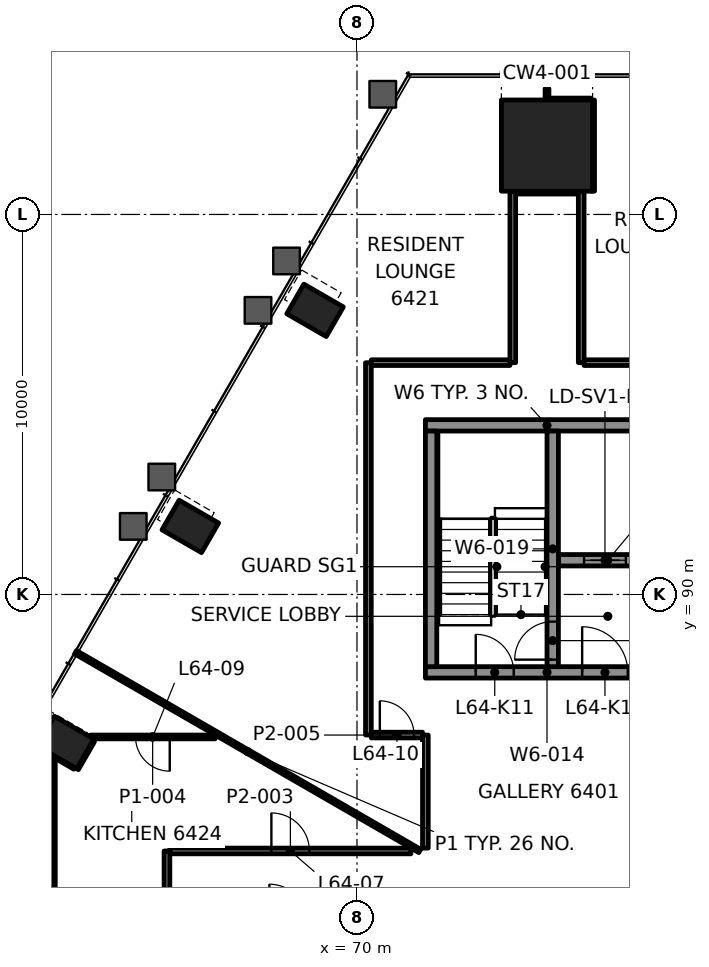
"""IFC4 building model, lengths in metres.
Left out: names, types, materials, properties, quantities, classifications, styles, units other than length and angle.
Written with IfcOpenShell. Run it as: python <this file> out.ifc"""

import sys

from ifc_helpers import new_model, si_unit, direction, frame, frame_2d, origin, origin_2d, place, context, subcontext, project, spatial, rectangle, hollow_rectangle, extrude, element, fill, save


model = new_model("IFC4")
c1 = context("Model", 3, precision=1e-05, world=origin(), true_north=direction((0.0, 1.0)))
c2 = subcontext(c1, "Body", "Model", "MODEL_VIEW")
j1 = project(units=[si_unit("LENGTHUNIT", "METRE"), si_unit("PLANEANGLEUNIT", "RADIAN")], contexts=[c1])
p1 = place(None, origin())
s1 = spatial("IfcSite", under=j1, at=p1, CompositionType="ELEMENT")
p2 = place(p1, origin())
s2 = spatial("IfcBuilding", under=s1, at=p2, CompositionType="ELEMENT")
p3 = place(p2, frame((0.0, 0.0, 270.6)))
s3 = spatial("IfcBuildingStorey", under=s2, at=p3, CompositionType="ELEMENT", Elevation=270.6)
p4 = place(p3, frame((75.0, 101.812, 0.0), z_axis=(0.0, 0.0, 1.0), x_axis=(-1.0, 0.0, 0.0)))
e1 = element("IfcColumn", 1, at=p4, inside=s3, PredefinedType="COLUMN", context=c2, shape_type="SweptSolid", body=[
    extrude(rectangle(XDim=2.4, YDim=2.4, at=origin_2d()), origin(), (0.0, 0.0, 1.0), 3.5),
])
for number, where, z_axis, x_axis in (
    (2, (68.897, 97.476, -0.0), (0.0, 0.0, 1.0), (-0.5, -0.866, 0.0)),
    (3, (65.614, 91.791, -0.0), (0.0, 0.0, 1.0), (-0.5, -0.866, 0.0)),
    (4, (62.332, 86.105, -0.0), (0.0, 0.0, 1.0), (-0.5, -0.866, 0.0)),
):
    element("IfcColumn", number, at=place(p3, frame(where, z_axis=z_axis, x_axis=x_axis)), inside=s3, PredefinedType="COLUMN", context=c2, shape_type="SweptSolid", body=[
        extrude(hollow_rectangle(XDim=0.9, YDim=1.2, WallThickness=0.06, at=origin_2d()), origin(), (0.0, 0.0, 1.0), 3.5),
    ])
p5 = place(p3, frame((71.8, 87.95, 0.0), z_axis=(0.0, 0.0, 1.0), x_axis=(1.0, 0.0, 0.0)))
e5 = element("IfcWall", 5, at=p5, inside=s3, PredefinedType="SHEAR", context=c2, shape_type="SweptSolid", body=[
    extrude(rectangle(XDim=6.4, YDim=0.3, at=frame_2d((3.2, 0.0))), origin(), (0.0, 0.0, 1.0), 3.3),
])
p6 = place(p5, frame((1.325, 0.0, 0.0)))
e6 = element("IfcOpeningElement", 6, at=p6, cuts=e5, PredefinedType="OPENING", context=c2, shape_type="SweptSolid", body=[
    extrude(rectangle(XDim=1.0, YDim=2.1, at=frame_2d((0.5, 1.05))), frame((0.0, 0.16, 0.0), z_axis=(0.0, -1.0, 0.0), x_axis=(1.0, 0.0, 0.0)), (0.0, 0.0, 1.0), 0.32),
])
p7 = place(p5, frame((4.125, 0.0, 0.0)))
e7 = element("IfcOpeningElement", 7, at=p7, cuts=e5, PredefinedType="OPENING", context=c2, shape_type="SweptSolid", body=[
    extrude(rectangle(XDim=1.2, YDim=2.1, at=frame_2d((0.6, 1.05))), frame((0.0, 0.16, 0.0), z_axis=(0.0, -1.0, 0.0), x_axis=(1.0, 0.0, 0.0)), (0.0, 0.0, 1.0), 0.32),
])
p8 = place(p3, frame((71.8, 94.45, 0.0), z_axis=(0.0, 0.0, 1.0), x_axis=(1.0, 0.0, 0.0)))
e8 = element("IfcWall", 8, at=p8, inside=s3, PredefinedType="SHEAR", context=c2, shape_type="SweptSolid", body=[
    extrude(rectangle(XDim=6.4, YDim=0.3, at=frame_2d((3.2, 0.0))), origin(), (0.0, 0.0, 1.0), 3.3),
])
p9 = place(p3, frame((71.95, 88.1, 0.0), z_axis=(0.0, 0.0, 1.0), x_axis=(0.0, 1.0, 0.0)))
e9 = element("IfcWall", 9, at=p9, inside=s3, PredefinedType="SHEAR", context=c2, shape_type="SweptSolid", body=[
    extrude(rectangle(XDim=6.2, YDim=0.3, at=frame_2d((3.1, 0.0))), origin(), (0.0, 0.0, 1.0), 3.3),
])
p10 = place(p3, frame((75.3, 90.9, 0.0), z_axis=(0.0, 0.0, 1.0), x_axis=(1.0, 0.0, 0.0)))
e10 = element("IfcWall", 10, at=p10, inside=s3, PredefinedType="SHEAR", context=c2, shape_type="SweptSolid", body=[
    extrude(rectangle(XDim=2.6, YDim=0.3, at=frame_2d((1.3, 0.0))), origin(), (0.0, 0.0, 1.0), 3.3),
])
p11 = place(p10, frame((0.675, 0.0, 0.0)))
e11 = element("IfcOpeningElement", 11, at=p11, cuts=e10, PredefinedType="OPENING", context=c2, shape_type="SweptSolid", body=[
    extrude(rectangle(XDim=1.1, YDim=2.1, at=frame_2d((0.55, 1.05))), frame((0.0, 0.16, 0.0), z_axis=(0.0, -1.0, 0.0), x_axis=(1.0, 0.0, 0.0)), (0.0, 0.0, 1.0), 0.32),
])
p12 = place(p3, frame((75.15, 88.1, 0.0), z_axis=(0.0, 0.0, 1.0), x_axis=(0.0, 1.0, 0.0)))
e12 = element("IfcWall", 12, at=p12, inside=s3, PredefinedType="SHEAR", context=c2, shape_type="SweptSolid", body=[
    extrude(rectangle(XDim=6.2, YDim=0.3, at=frame_2d((3.1, 0.0))), origin(), (0.0, 0.0, 1.0), 3.3),
])
p13 = place(p12, frame((0.185, 0.0, 0.0)))
e13 = element("IfcOpeningElement", 13, at=p13, cuts=e12, PredefinedType="OPENING", context=c2, shape_type="SweptSolid", body=[
    extrude(rectangle(XDim=1.0, YDim=2.1, at=frame_2d((0.5, 1.05))), frame((0.0, 0.16, 0.0), z_axis=(0.0, -1.0, 0.0), x_axis=(1.0, 0.0, 0.0)), (0.0, 0.0, 1.0), 0.32),
])
p14 = place(p3, frame((65.075, 83.25, 0.0), z_axis=(0.0, 0.0, 1.0), x_axis=(1.0, 0.0, 0.0)))
e14 = element("IfcWall", 14, at=p14, inside=s3, PredefinedType="PARTITIONING", context=c2, shape_type="SweptSolid", body=[
    extrude(rectangle(XDim=6.345, YDim=0.15, at=frame_2d((3.172, 0.0))), origin(), (0.0, 0.0, 1.0), 2.7),
])
p15 = place(p14, frame((2.672, 0.0, 0.0)))
e15 = element("IfcOpeningElement", 15, at=p15, cuts=e14, PredefinedType="OPENING", context=c2, shape_type="SweptSolid", body=[
    extrude(rectangle(XDim=1.0, YDim=2.1, at=frame_2d((0.5, 1.05))), frame((0.0, 0.085, 0.0), z_axis=(0.0, -1.0, 0.0), x_axis=(1.0, 0.0, 0.0)), (0.0, 0.0, 1.0), 0.17),
])
p16 = place(p3, frame((66.267, 86.25, 0.0), z_axis=(0.0, 0.0, 1.0), x_axis=(-1.0, 0.0, 0.0)))
e16 = element("IfcWall", 16, at=p16, inside=s3, PredefinedType="PARTITIONING", context=c2, shape_type="SweptSolid", body=[
    extrude(rectangle(XDim=3.287, YDim=0.1, at=frame_2d((1.644, 0.0))), origin(), (0.0, 0.0, 1.0), 2.7),
])
p17 = place(p16, frame((1.193, 0.0, 0.0)))
e17 = element("IfcOpeningElement", 17, at=p17, cuts=e16, PredefinedType="OPENING", context=c2, shape_type="SweptSolid", body=[
    extrude(rectangle(XDim=0.9, YDim=2.1, at=frame_2d((0.45, 1.05))), frame((0.0, 0.06, 0.0), z_axis=(0.0, -1.0, 0.0), x_axis=(1.0, 0.0, 0.0)), (0.0, 0.0, 1.0), 0.12),
])
p18 = place(p3, frame((70.377, 86.3, 0.0), z_axis=(0.0, 0.0, 1.0), x_axis=(1.0, 0.0, 0.0)))
e18 = element("IfcWall", 18, at=p18, inside=s3, PredefinedType="PARTITIONING", context=c2, shape_type="SweptSolid", body=[
    extrude(rectangle(XDim=1.348, YDim=0.15, at=frame_2d((0.674, 0.0))), origin(), (0.0, 0.0, 1.0), 2.7),
])
p19 = place(p18, frame((0.224, 0.0, 0.0)))
e19 = element("IfcOpeningElement", 19, at=p19, cuts=e18, PredefinedType="OPENING", context=c2, shape_type="SweptSolid", body=[
    extrude(rectangle(XDim=0.9, YDim=2.1, at=frame_2d((0.45, 1.05))), frame((0.0, 0.085, 0.0), z_axis=(0.0, -1.0, 0.0), x_axis=(1.0, 0.0, 0.0)), (0.0, 0.0, 1.0), 0.17),
])
for number, where, z_axis, x_axis in (
    (20, (70.377, 96.1, 0.0), (0.0, 0.0, 1.0), (1.0, 0.0, 0.0)),
    (21, (75.975, 96.1, 0.0), (0.0, 0.0, 1.0), (1.0, 0.0, 0.0)),
):
    element("IfcWall", number, at=place(p3, frame(where, z_axis=z_axis, x_axis=x_axis)), inside=s3, PredefinedType="PARTITIONING", context=c2, shape_type="SweptSolid", body=[
        extrude(rectangle(XDim=3.648, YDim=0.15, at=frame_2d((1.824, 0.0))), origin(), (0.0, 0.0, 1.0), 2.7),
    ])
p20 = place(p3, frame((74.176, 100.612, 0.0), z_axis=(0.0, 0.0, 1.0), x_axis=(1.0, 0.0, 0.0)))
e22 = element("IfcWall", 22, at=p20, inside=s3, PredefinedType="PARTITIONING", context=c2, shape_type="SweptSolid", body=[
    extrude(rectangle(XDim=1.643, YDim=0.15, at=frame_2d((0.821, 0.0))), origin(), (0.0, 0.0, 1.0), 2.697),
])
p21 = place(p3, frame((75.0, 103.012, 0.0), z_axis=(0.0, 0.0, 1.0), x_axis=(1.0, 0.0, 0.0)))
e23 = element("IfcWall", 23, at=p21, inside=s3, PredefinedType="PARTITIONING", context=c2, shape_type="SweptSolid", body=[
    extrude(rectangle(XDim=1.147, YDim=0.1, at=frame_2d((0.574, 0.0))), origin(), (0.0, 0.0, 1.0), 2.7),
])
p22 = place(p3, frame((62.626, 85.415, 0.0), z_axis=(0.0, 0.0, 1.0), x_axis=(0.499973348067, 0.866040790738, 0.0)))
e24 = element("IfcWall", 24, at=p22, inside=s3, PredefinedType="PARTITIONING", context=c2, shape_type="SweptSolid", body=[
    extrude(rectangle(XDim=0.842, YDim=0.1, at=frame_2d((0.421, 0.0))), origin(), (0.0, 0.0, 1.0), 2.7),
])
p23 = place(p3, frame((76.2, 100.614, 0.0), z_axis=(0.0, 0.0, 1.0), x_axis=(0.0, 1.0, 0.0)))
e25 = element("IfcWall", 25, at=p23, inside=s3, PredefinedType="PARTITIONING", context=c2, shape_type="SweptSolid", body=[
    extrude(rectangle(XDim=2.396, YDim=0.1, at=frame_2d((1.198, 0.0))), origin(), (0.0, 0.0, 1.0), 2.7),
])
p24 = place(p3, frame((75.9, 96.1, 0.0), z_axis=(0.0, 0.0, 1.0), x_axis=(0.0, 1.0, 0.0)))
e26 = element("IfcWall", 26, at=p24, inside=s3, PredefinedType="PARTITIONING", context=c2, shape_type="SweptSolid", body=[
    extrude(rectangle(XDim=4.512, YDim=0.15, at=frame_2d((2.256, 0.0))), origin(), (0.0, 0.0, 1.0), 2.7),
])
p25 = place(p3, frame((75.0, 103.062, 0.0), z_axis=(0.0, 0.0, 1.0), x_axis=(0.0, 1.0, 0.0)))
e27 = element("IfcWall", 27, at=p25, inside=s3, PredefinedType="PARTITIONING", context=c2, shape_type="SweptSolid", body=[
    extrude(rectangle(XDim=0.249, YDim=0.1, at=frame_2d((0.125, 0.0))), origin(), (0.0, 0.0, 1.0), 2.7),
])
p26 = place(p3, frame((74.1, 96.1, 0.0), z_axis=(0.0, 0.0, 1.0), x_axis=(0.0, 1.0, 0.0)))
e28 = element("IfcWall", 28, at=p26, inside=s3, PredefinedType="PARTITIONING", context=c2, shape_type="SweptSolid", body=[
    extrude(rectangle(XDim=4.511, YDim=0.15, at=frame_2d((2.256, 0.0))), origin(), (0.0, 0.0, 1.0), 2.7),
])
p27 = place(p3, frame((71.8, 83.325, 0.0), z_axis=(0.0, 0.0, 1.0), x_axis=(0.0, 1.0, 0.0)))
e29 = element("IfcWall", 29, at=p27, inside=s3, PredefinedType="PARTITIONING", context=c2, shape_type="SweptSolid", body=[
    extrude(rectangle(XDim=2.975, YDim=0.15, at=frame_2d((1.488, 0.0))), origin(), (0.0, 0.0, 1.0), 2.697),
])
p28 = place(p3, frame((70.3, 86.302, 0.0), z_axis=(0.0, 0.0, 1.0), x_axis=(0.0, 1.0, 0.0)))
e30 = element("IfcWall", 30, at=p28, inside=s3, PredefinedType="PARTITIONING", context=c2, shape_type="SweptSolid", body=[
    extrude(rectangle(XDim=9.796, YDim=0.15, at=frame_2d((4.898, 0.0))), origin(), (0.0, 0.0, 1.0), 2.7),
])
p29 = place(p3, frame((65.0, 70.352, 0.0), z_axis=(0.0, 0.0, 1.0), x_axis=(0.0, 1.0, 0.0)))
e31 = element("IfcWall", 31, at=p29, inside=s3, PredefinedType="PARTITIONING", context=c2, shape_type="SweptSolid", body=[
    extrude(rectangle(XDim=12.898, YDim=0.15, at=frame_2d((6.449, 0.0))), origin(), (0.0, 0.0, 1.0), 2.7),
])
p30 = place(p3, frame((62.0, 85.776, 0.0), z_axis=(0.0, 0.0, 1.0), x_axis=(0.0, -1.0, 0.0)))
e32 = element("IfcWall", 32, at=p30, inside=s3, PredefinedType="PARTITIONING", context=c2, shape_type="SweptSolid", body=[
    extrude(rectangle(XDim=12.115, YDim=0.12, at=frame_2d((6.058, 0.0))), origin(), (0.0, 0.0, 1.0), 2.688),
])
p31 = place(p30, frame((7.226, 0.0, 0.0)))
e33 = element("IfcOpeningElement", 33, at=p31, cuts=e32, PredefinedType="OPENING", context=c2, shape_type="SweptSolid", body=[
    extrude(rectangle(XDim=0.8, YDim=2.1, at=frame_2d((0.4, 1.05))), frame((0.0, 0.07, 0.0), z_axis=(0.0, -1.0, 0.0), x_axis=(1.0, 0.0, 0.0)), (0.0, 0.0, 1.0), 0.14),
])
p32 = place(p30, frame((10.487, 0.0, 0.0)))
e34 = element("IfcOpeningElement", 34, at=p32, cuts=e32, PredefinedType="OPENING", context=c2, shape_type="SweptSolid", body=[
    extrude(rectangle(XDim=0.9, YDim=2.1, at=frame_2d((0.45, 1.05))), frame((0.0, 0.07, 0.0), z_axis=(0.0, -1.0, 0.0), x_axis=(1.0, 0.0, 0.0)), (0.0, 0.0, 1.0), 0.14),
])
p33 = place(p3, frame((71.653, 83.25, 0.0), z_axis=(0.0, 0.0, 1.0), x_axis=(-0.866025448133, 0.499999923186, 0.0)))
e35 = element("IfcWall", 35, at=p33, inside=s3, PredefinedType="PARTITIONING", context=c2, shape_type="SweptSolid", body=[
    extrude(rectangle(XDim=10.46, YDim=0.1, at=frame_2d((5.23, 0.0))), origin(), (0.0, 0.0, 1.0), 2.688),
])
p34 = place(p3, frame((62.574, 85.445, 0.0), z_axis=(0.0, 0.0, 1.0), x_axis=(-0.866048512801, 0.499959971872, 0.0)))
e36 = element("IfcWall", 36, at=p34, inside=s3, PredefinedType="PARTITIONING", context=c2, shape_type="SweptSolid", body=[
    extrude(rectangle(XDim=0.563, YDim=0.1, at=frame_2d((0.282, 0.0))), origin(), (0.0, 0.0, 1.0), 2.688),
])
p35 = place(p15, origin())
e37 = element("IfcDoor", 37, at=p35, inside=s3, OperationType="SINGLE_SWING_RIGHT", PredefinedType="DOOR", context=c2, shape_type="SweptSolid", body=[
    extrude(rectangle(XDim=1.0, YDim=2.1, at=frame_2d((0.5, 1.05))), frame((0.0, 0.025, 0.0), z_axis=(0.0, -1.0, 0.0), x_axis=(1.0, 0.0, 0.0)), (0.0, 0.0, 1.0), 0.05),
])
fill(e15, e37)
p36 = place(p17, origin())
e38 = element("IfcDoor", 38, at=p36, inside=s3, OperationType="SINGLE_SWING_RIGHT", PredefinedType="DOOR", context=c2, shape_type="SweptSolid", body=[
    extrude(rectangle(XDim=0.9, YDim=2.1, at=frame_2d((0.45, 1.05))), frame((0.0, 0.025, 0.0), z_axis=(0.0, -1.0, 0.0), x_axis=(1.0, 0.0, 0.0)), (0.0, 0.0, 1.0), 0.05),
])
fill(e17, e38)
p37 = place(p19, origin())
e39 = element("IfcDoor", 39, at=p37, inside=s3, OperationType="SINGLE_SWING_RIGHT", PredefinedType="DOOR", context=c2, shape_type="SweptSolid", body=[
    extrude(rectangle(XDim=0.9, YDim=2.1, at=frame_2d((0.45, 1.05))), frame((0.0, 0.025, 0.0), z_axis=(0.0, -1.0, 0.0), x_axis=(1.0, 0.0, 0.0)), (0.0, 0.0, 1.0), 0.05),
])
fill(e19, e39)
p38 = place(p11, origin())
e40 = element("IfcDoor", 40, at=p38, inside=s3, OperationType="DOUBLE_DOOR_SLIDING", PredefinedType="DOOR", context=c2, shape_type="SweptSolid", body=[
    extrude(rectangle(XDim=1.1, YDim=2.1, at=frame_2d((0.55, 1.05))), frame((0.0, 0.025, 0.0), z_axis=(0.0, -1.0, 0.0), x_axis=(1.0, 0.0, 0.0)), (0.0, 0.0, 1.0), 0.05),
])
fill(e11, e40)
p39 = place(p6, origin())
e41 = element("IfcDoor", 41, at=p39, inside=s3, OperationType="SINGLE_SWING_RIGHT", PredefinedType="DOOR", context=c2, shape_type="SweptSolid", body=[
    extrude(rectangle(XDim=1.0, YDim=2.1, at=frame_2d((0.5, 1.05))), frame((0.0, 0.025, 0.0), z_axis=(0.0, -1.0, 0.0), x_axis=(1.0, 0.0, 0.0)), (0.0, 0.0, 1.0), 0.05),
])
fill(e6, e41)
p40 = place(p13, origin())
e42 = element("IfcDoor", 42, at=p40, inside=s3, OperationType="SINGLE_SWING_LEFT", PredefinedType="DOOR", context=c2, shape_type="SweptSolid", body=[
    extrude(rectangle(XDim=1.0, YDim=2.1, at=frame_2d((0.5, 1.05))), frame((0.0, 0.025, 0.0), z_axis=(0.0, -1.0, 0.0), x_axis=(1.0, 0.0, 0.0)), (0.0, 0.0, 1.0), 0.05),
])
fill(e13, e42)
p41 = place(p7, origin())
e43 = element("IfcDoor", 43, at=p41, inside=s3, OperationType="SINGLE_SWING_RIGHT", PredefinedType="DOOR", context=c2, shape_type="SweptSolid", body=[
    extrude(rectangle(XDim=1.2, YDim=2.1, at=frame_2d((0.6, 1.05))), frame((0.0, 0.025, 0.0), z_axis=(0.0, -1.0, 0.0), x_axis=(1.0, 0.0, 0.0)), (0.0, 0.0, 1.0), 0.05),
])
fill(e7, e43)
save(model, sys.argv[1])
